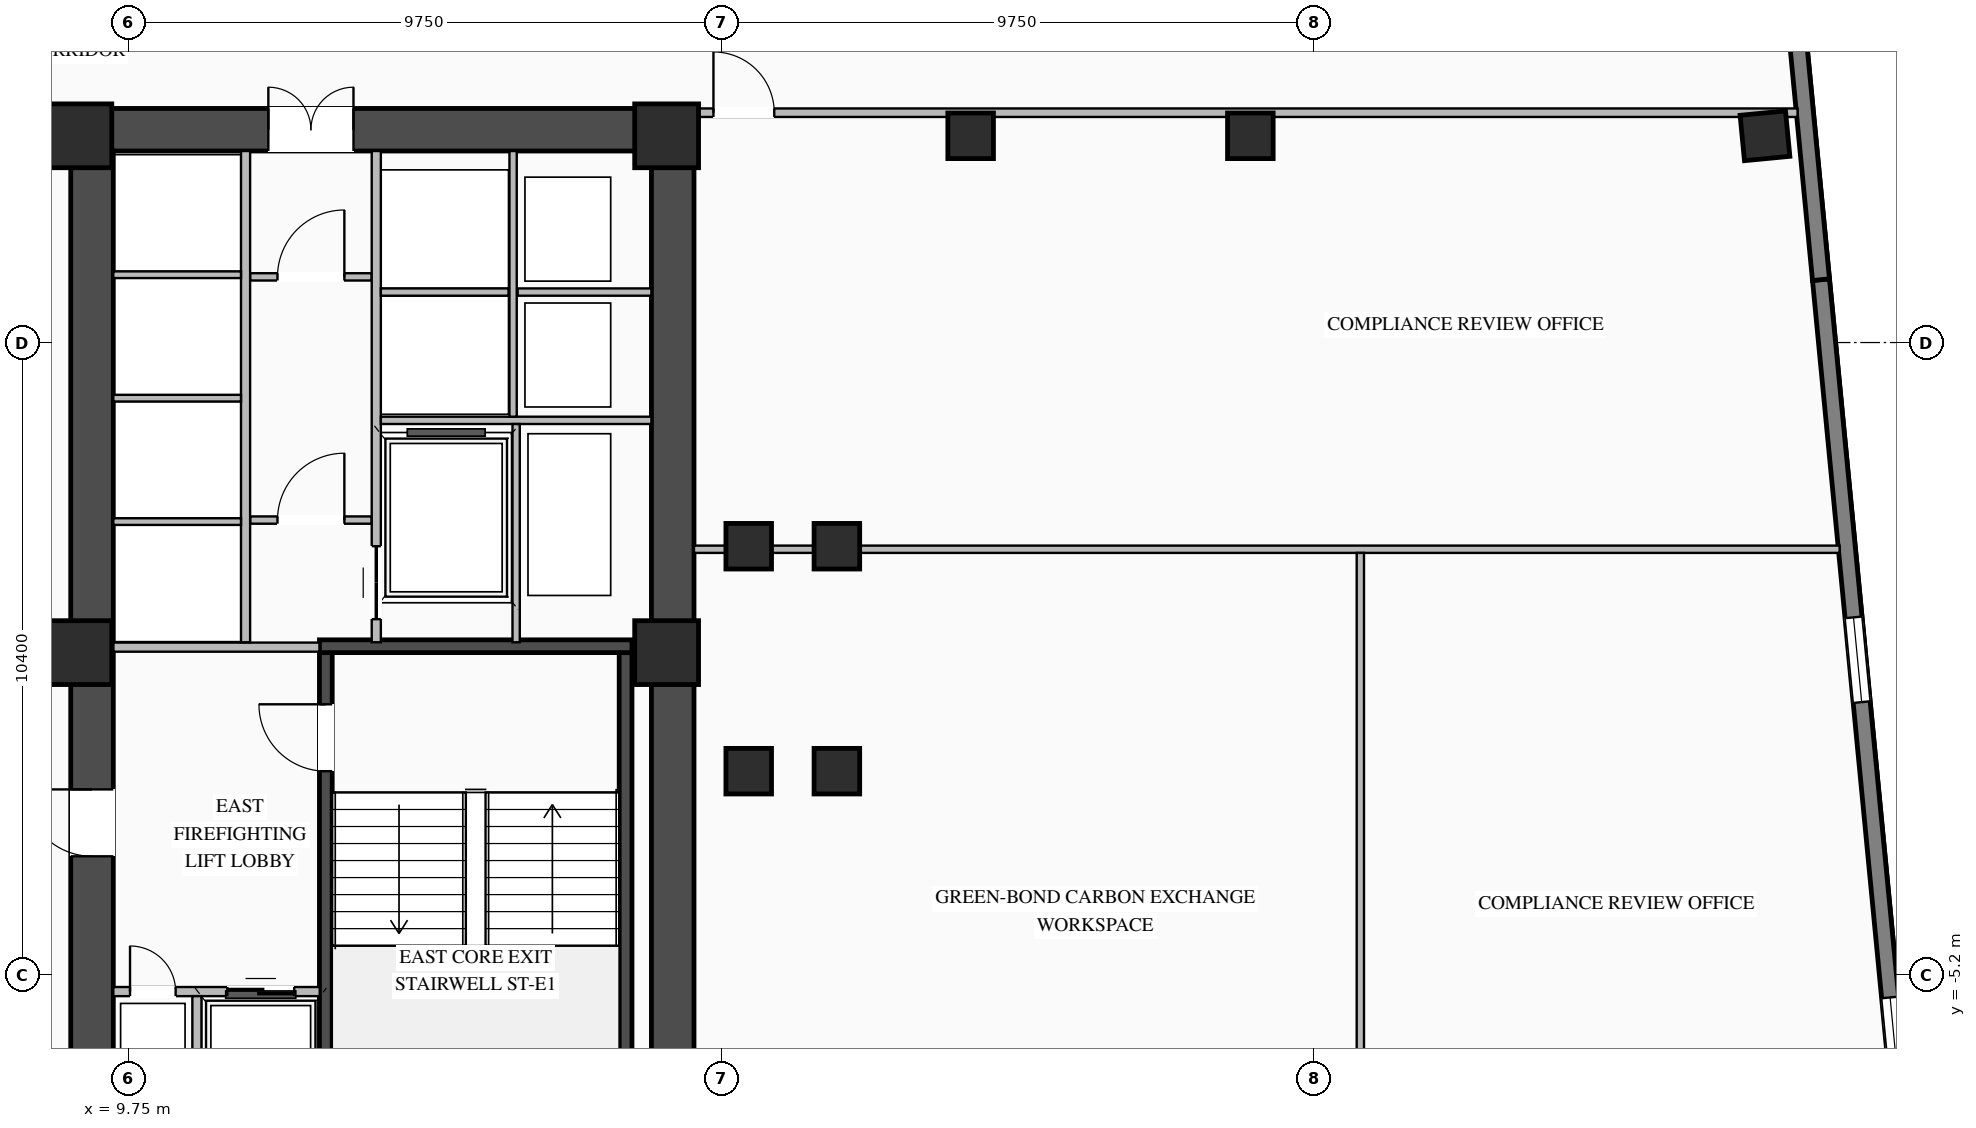
"""IFC4 building model, lengths in metres.
Left out: names, types, materials, properties, quantities, classifications, styles, units other than length and angle.
Written with IfcOpenShell. Run it as: python <this file> out.ifc"""

import sys

from ifc_helpers import new_model, si_unit, direction, frame, frame_2d, origin, origin_2d, place, context, subcontext, project, spatial, rectangle, i_section, extrude, element, fill, save


model = new_model("IFC4")
c1 = context("Model", 3, precision=1e-05, world=origin(), true_north=direction((0.0, 1.0)))
c2 = subcontext(c1, "Body", "Model", "MODEL_VIEW")
j1 = project(units=[si_unit("LENGTHUNIT", "METRE"), si_unit("PLANEANGLEUNIT", "RADIAN")], contexts=[c1])
p1 = place(None, origin())
s1 = spatial("IfcSite", under=j1, at=p1, CompositionType="ELEMENT")
p2 = place(p1, origin())
s2 = spatial("IfcBuilding", under=s1, at=p2, CompositionType="ELEMENT")
p3 = place(p2, frame((0.0, 0.0, 94.9)))
s3 = spatial("IfcBuildingStorey", under=s2, at=p3, CompositionType="ELEMENT", Elevation=94.9)
p4 = place(p3, frame((8.8, 8.7, 0.0), z_axis=(0.0, 0.0, 1.0), x_axis=(1.0, 0.0, 0.0)))
e1 = element("IfcWall", 1, at=p4, inside=s3, PredefinedType="SHEAR", context=c2, shape_type="SweptSolid", body=[
    extrude(rectangle(XDim=10.25, YDim=0.7, at=frame_2d((5.125, 0.0))), origin(), (0.0, 0.0, 1.0), 3.27),
])
p5 = place(p4, frame((3.25, 0.0, 0.0)))
e2 = element("IfcOpeningElement", 2, at=p5, cuts=e1, PredefinedType="OPENING", context=c2, shape_type="SweptSolid", body=[
    extrude(rectangle(XDim=1.4, YDim=2.05, at=frame_2d((0.7, 1.025))), frame((0.0, 0.36, 0.0), z_axis=(0.0, -1.0, 0.0), x_axis=(1.0, 0.0, 0.0)), (0.0, 0.0, 1.0), 0.72),
])
p6 = place(p3, frame((9.15, -8.35, 0.0), z_axis=(0.0, 0.0, 1.0), x_axis=(0.0, 1.0, 0.0)))
e3 = element("IfcWall", 3, at=p6, inside=s3, PredefinedType="SHEAR", context=c2, shape_type="SweptSolid", body=[
    extrude(rectangle(XDim=16.7, YDim=0.7, at=frame_2d((8.35, 0.0))), origin(), (0.0, 0.0, 1.0), 3.27),
])
p7 = place(p6, frame((5.1, 0.0, 0.0)))
e4 = element("IfcOpeningElement", 4, at=p7, cuts=e3, PredefinedType="OPENING", context=c2, shape_type="SweptSolid", body=[
    extrude(rectangle(XDim=1.1, YDim=2.08, at=frame_2d((0.55, 1.04))), frame((0.0, 0.36, 0.0), z_axis=(0.0, -1.0, 0.0), x_axis=(1.0, 0.0, 0.0)), (0.0, 0.0, 1.0), 0.72),
])
p8 = place(p3, frame((18.7, -8.35, 0.0), z_axis=(0.0, 0.0, 1.0), x_axis=(0.0, 1.0, 0.0)))
e5 = element("IfcWall", 5, at=p8, inside=s3, PredefinedType="SHEAR", context=c2, shape_type="SweptSolid", body=[
    extrude(rectangle(XDim=16.7, YDim=0.7, at=frame_2d((8.35, 0.0))), origin(), (0.0, 0.0, 1.0), 3.27),
])
p9 = place(p3, frame((12.995, -8.1, 0.0), z_axis=(0.0, 0.0, 1.0), x_axis=(0.0, 1.0, 0.0)))
e6 = element("IfcWall", 6, at=p9, inside=s3, PredefinedType="SHEAR", context=c2, shape_type="SweptSolid", body=[
    extrude(rectangle(XDim=8.2, YDim=0.21, at=frame_2d((4.1, 0.0))), origin(), (0.0, 0.0, 1.0), 3.27),
])
p10 = place(p9, frame((6.25, 0.0, 0.0)))
e7 = element("IfcOpeningElement", 7, at=p10, cuts=e6, PredefinedType="OPENING", context=c2, shape_type="SweptSolid", body=[
    extrude(rectangle(XDim=1.1, YDim=2.15, at=frame_2d((0.55, 1.075))), frame((0.0, 0.115, 0.0), z_axis=(0.0, -1.0, 0.0), x_axis=(1.0, 0.0, 0.0)), (0.0, 0.0, 1.0), 0.23),
])
p11 = place(p3, frame((17.925, -8.1, 0.0), z_axis=(0.0, 0.0, 1.0), x_axis=(0.0, 1.0, 0.0)))
e8 = element("IfcWall", 8, at=p11, inside=s3, PredefinedType="SHEAR", context=c2, shape_type="SweptSolid", body=[
    extrude(rectangle(XDim=8.2, YDim=0.21, at=frame_2d((4.1, 0.0))), origin(), (0.0, 0.0, 1.0), 3.27),
])
p12 = place(p3, frame((18.03, 0.205, 0.0), z_axis=(0.0, 0.0, 1.0), x_axis=(-1.0, 0.0, 0.0)))
e9 = element("IfcWall", 9, at=p12, inside=s3, PredefinedType="SHEAR", context=c2, shape_type="SweptSolid", body=[
    extrude(rectangle(XDim=5.14, YDim=0.21, at=frame_2d((2.57, 0.0))), origin(), (0.0, 0.0, 1.0), 3.27),
])
for number, where, z_axis, x_axis in (
    (10, (8.95, 0.1, 0.0), (0.0, 0.0, 1.0), (1.0, 0.0, 0.0)),
    (11, (8.95, 8.6, 0.0), (0.0, 0.0, 1.0), (1.0, 0.0, 0.0)),
    (12, (18.6, 0.1, 0.0), (0.0, 0.0, 1.0), (1.0, 0.0, 0.0)),
    (13, (18.6, 8.6, 0.0), (0.0, 0.0, 1.0), (1.0, 0.0, 0.0)),
):
    element("IfcColumn", number, at=place(p3, frame(where, z_axis=z_axis, x_axis=x_axis)), inside=s3, PredefinedType="COLUMN", context=c2, shape_type="SweptSolid", body=[
        extrude(rectangle(XDim=1.05, YDim=1.05, at=origin_2d()), origin(), (0.0, 0.0, 1.0), 3.45),
    ])
for number, where, z_axis, x_axis in (
    (14, (19.95, -1.85, 0.0), (0.0, 0.0, 1.0), (1.0, 0.0, 0.0)),
    (15, (19.95, 1.85, 0.0), (0.0, 0.0, 1.0), (1.0, 0.0, 0.0)),
    (16, (21.4, -1.85, 0.0), (0.0, 0.0, 1.0), (1.0, 0.0, 0.0)),
    (17, (21.4, 1.85, 0.0), (0.0, 0.0, 1.0), (1.0, 0.0, 0.0)),
    (18, (23.6, 8.6, 0.0), (0.0, 0.0, 1.0), (1.0, 0.0, 0.0)),
    (19, (28.2, 8.6, 0.0), (0.0, 0.0, 1.0), (1.0, 0.0, 0.0)),
    (20, (36.664, 8.6, 0.0), (0.0, 0.0, 1.0), (0.995, 0.096, 0.0)),
):
    element("IfcColumn", number, at=place(p3, frame(where, z_axis=z_axis, x_axis=x_axis)), inside=s3, PredefinedType="COLUMN", context=c2, shape_type="SweptSolid", body=[
        extrude(i_section(OverallWidth=0.75, OverallDepth=0.75, WebThickness=0.03, FlangeThickness=0.044, at=origin_2d()), origin(), (0.0, 0.0, 1.0), 3.45),
    ])
p13 = place(p3, frame((37.585, 6.234, 0.0), z_axis=(0.0, 0.0, 1.0), x_axis=(0.095841297881, -0.99539662729, 0.0)))
e21 = element("IfcWall", 21, at=p13, inside=s3, PredefinedType="STANDARD", context=c2, shape_type="SweptSolid", body=[
    extrude(rectangle(XDim=18.84, YDim=0.28, at=frame_2d((9.42, 0.0))), origin(), (0.0, 0.0, 1.0), 3.25),
])
p14 = place(p13, frame((5.58, 0.0, 0.76)))
e22 = element("IfcOpeningElement", 22, at=p14, cuts=e21, PredefinedType="OPENING", context=c2, shape_type="SweptSolid", body=[
    extrude(rectangle(XDim=1.4, YDim=1.95, at=frame_2d((0.7, 0.975))), frame((0.0, 0.15, 0.0), z_axis=(0.0, -1.0, 0.0), x_axis=(1.0, 0.0, 0.0)), (0.0, 0.0, 1.0), 0.3),
])
p15 = place(p13, frame((11.86, 0.0, 0.76)))
e23 = element("IfcOpeningElement", 23, at=p15, cuts=e21, PredefinedType="OPENING", context=c2, shape_type="SweptSolid", body=[
    extrude(rectangle(XDim=1.4, YDim=1.95, at=frame_2d((0.7, 0.975))), frame((0.0, 0.15, 0.0), z_axis=(0.0, -1.0, 0.0), x_axis=(1.0, 0.0, 0.0)), (0.0, 0.0, 1.0), 0.3),
])
p16 = place(p3, frame((35.779, 24.987, 0.0), z_axis=(0.0, 0.0, 1.0), x_axis=(0.095842534142, -0.995396508256, 0.0)))
e24 = element("IfcWall", 24, at=p16, inside=s3, PredefinedType="STANDARD", context=c2, shape_type="SweptSolid", body=[
    extrude(rectangle(XDim=18.84, YDim=0.28, at=frame_2d((9.42, 0.0))), origin(), (0.0, 0.0, 1.0), 3.25),
])
p17 = place(p16, frame((5.58, 0.0, 0.76)))
e25 = element("IfcOpeningElement", 25, at=p17, cuts=e24, PredefinedType="OPENING", context=c2, shape_type="SweptSolid", body=[
    extrude(rectangle(XDim=1.4, YDim=1.95, at=frame_2d((0.7, 0.975))), frame((0.0, 0.15, 0.0), z_axis=(0.0, -1.0, 0.0), x_axis=(1.0, 0.0, 0.0)), (0.0, 0.0, 1.0), 0.3),
])
p18 = place(p16, frame((11.86, 0.0, 0.76)))
e26 = element("IfcOpeningElement", 26, at=p18, cuts=e24, PredefinedType="OPENING", context=c2, shape_type="SweptSolid", body=[
    extrude(rectangle(XDim=1.4, YDim=1.95, at=frame_2d((0.7, 0.975))), frame((0.0, 0.15, 0.0), z_axis=(0.0, -1.0, 0.0), x_axis=(1.0, 0.0, 0.0)), (0.0, 0.0, 1.0), 0.3),
])
p19 = place(p3, frame((9.5, -5.475, 0.0), z_axis=(0.0, 0.0, 1.0), x_axis=(1.0, 0.0, 0.0)))
e27 = element("IfcWall", 27, at=p19, inside=s3, PredefinedType="STANDARD", context=c2, shape_type="SweptSolid", body=[
    extrude(rectangle(XDim=3.395, YDim=0.15, at=frame_2d((1.698, 0.0))), origin(), (0.0, 0.0, 1.0), 3.25),
])
p20 = place(p19, frame((1.875, 0.0, 0.0)))
e28 = element("IfcOpeningElement", 28, at=p20, cuts=e27, PredefinedType="OPENING", context=c2, shape_type="SweptSolid", body=[
    extrude(rectangle(XDim=1.1, YDim=2.15, at=frame_2d((0.55, 1.075))), frame((0.0, 0.085, 0.0), z_axis=(0.0, -1.0, 0.0), x_axis=(1.0, 0.0, 0.0)), (0.0, 0.0, 1.0), 0.17),
])
p21 = place(p19, frame((0.275, 0.0, 0.0)))
e29 = element("IfcOpeningElement", 29, at=p21, cuts=e27, PredefinedType="OPENING", context=c2, shape_type="SweptSolid", body=[
    extrude(rectangle(XDim=0.75, YDim=2.05, at=frame_2d((0.375, 1.025))), frame((0.0, 0.085, 0.0), z_axis=(0.0, -1.0, 0.0), x_axis=(1.0, 0.0, 0.0)), (0.0, 0.0, 1.0), 0.17),
])
p22 = place(p3, frame((10.875, -8.35, 0.0), z_axis=(0.0, 0.0, 1.0), x_axis=(0.0, 1.0, 0.0)))
e30 = element("IfcWall", 30, at=p22, inside=s3, PredefinedType="STANDARD", context=c2, shape_type="SweptSolid", body=[
    extrude(rectangle(XDim=2.8, YDim=0.15, at=frame_2d((1.4, 0.0))), origin(), (0.0, 0.0, 1.0), 3.25),
])
p23 = place(p3, frame((9.5, 0.19, 0.0), z_axis=(0.0, 0.0, 1.0), x_axis=(1.0, 0.0, 0.0)))
e31 = element("IfcWall", 31, at=p23, inside=s3, PredefinedType="STANDARD", context=c2, shape_type="SweptSolid", body=[
    extrude(rectangle(XDim=3.39, YDim=0.15, at=frame_2d((1.695, 0.0))), origin(), (0.0, 0.0, 1.0), 2.645),
])
p24 = place(p3, frame((11.75, 2.28, 0.0), z_axis=(0.0, 0.0, 1.0), x_axis=(1.0, 0.0, 0.0)))
e32 = element("IfcWall", 32, at=p24, inside=s3, PredefinedType="STANDARD", context=c2, shape_type="SweptSolid", body=[
    extrude(rectangle(XDim=2.0, YDim=0.12, at=frame_2d((1.0, 0.0))), origin(), (0.0, 0.0, 1.0), 3.25),
])
p25 = place(p24, frame((0.45, 0.0, 0.0)))
e33 = element("IfcOpeningElement", 33, at=p25, cuts=e32, PredefinedType="OPENING", context=c2, shape_type="SweptSolid", body=[
    extrude(rectangle(XDim=1.1, YDim=2.1, at=frame_2d((0.55, 1.05))), frame((0.0, 0.07, 0.0), z_axis=(0.0, -1.0, 0.0), x_axis=(1.0, 0.0, 0.0)), (0.0, 0.0, 1.0), 0.14),
])
p26 = place(p3, frame((11.75, 6.28, 0.0), z_axis=(0.0, 0.0, 1.0), x_axis=(1.0, 0.0, 0.0)))
e34 = element("IfcWall", 34, at=p26, inside=s3, PredefinedType="STANDARD", context=c2, shape_type="SweptSolid", body=[
    extrude(rectangle(XDim=2.0, YDim=0.12, at=frame_2d((1.0, 0.0))), origin(), (0.0, 0.0, 1.0), 3.25),
])
p27 = place(p26, frame((0.45, 0.0, 0.0)))
e35 = element("IfcOpeningElement", 35, at=p27, cuts=e34, PredefinedType="OPENING", context=c2, shape_type="SweptSolid", body=[
    extrude(rectangle(XDim=1.1, YDim=2.1, at=frame_2d((0.55, 1.05))), frame((0.0, 0.07, 0.0), z_axis=(0.0, -1.0, 0.0), x_axis=(1.0, 0.0, 0.0)), (0.0, 0.0, 1.0), 0.14),
])
p28 = place(p3, frame((11.675, 0.27, 0.0), z_axis=(0.0, 0.0, 1.0), x_axis=(0.0, 1.0, 0.0)))
e36 = element("IfcWall", 36, at=p28, inside=s3, PredefinedType="STANDARD", context=c2, shape_type="SweptSolid", body=[
    extrude(rectangle(XDim=8.08, YDim=0.15, at=frame_2d((4.04, 0.0))), origin(), (0.0, 0.0, 1.0), 3.25),
])
for number, where, z_axis, x_axis in (
    (37, (9.5, 2.255, 0.0), (0.0, 0.0, 1.0), (1.0, 0.0, 0.0)),
    (38, (9.5, 4.285, 0.0), (0.0, 0.0, 1.0), (1.0, 0.0, 0.0)),
    (39, (9.5, 6.315, 0.0), (0.0, 0.0, 1.0), (1.0, 0.0, 0.0)),
):
    element("IfcWall", number, at=place(p3, frame(where, z_axis=z_axis, x_axis=x_axis)), inside=s3, PredefinedType="STANDARD", context=c2, shape_type="SweptSolid", body=[
        extrude(rectangle(XDim=2.1, YDim=0.11, at=frame_2d((1.05, 0.0))), origin(), (0.0, 0.0, 1.0), 3.25),
    ])
p29 = place(p3, frame((13.825, 0.27, 0.0), z_axis=(0.0, 0.0, 1.0), x_axis=(0.0, 1.0, 0.0)))
e40 = element("IfcWall", 40, at=p29, inside=s3, PredefinedType="STANDARD", context=c2, shape_type="SweptSolid", body=[
    extrude(rectangle(XDim=8.08, YDim=0.15, at=frame_2d((4.04, 0.0))), origin(), (0.0, 0.0, 1.0), 3.25),
])
p30 = place(p29, frame((0.38, 0.0, 0.0)))
e41 = element("IfcOpeningElement", 41, at=p30, cuts=e40, PredefinedType="OPENING", context=c2, shape_type="SweptSolid", body=[
    extrude(rectangle(XDim=1.2, YDim=2.1, at=frame_2d((0.6, 1.05))), frame((0.0, 0.085, 0.0), z_axis=(0.0, -1.0, 0.0), x_axis=(1.0, 0.0, 0.0)), (0.0, 0.0, 1.0), 0.17),
])
p31 = place(p3, frame((13.9, 3.92, 0.0), z_axis=(0.0, 0.0, 1.0), x_axis=(1.0, 0.0, 0.0)))
e42 = element("IfcWall", 42, at=p31, inside=s3, PredefinedType="STANDARD", context=c2, shape_type="SweptSolid", body=[
    extrude(rectangle(XDim=4.45, YDim=0.12, at=frame_2d((2.225, 0.0))), origin(), (0.0, 0.0, 1.0), 3.25),
])
p32 = place(p3, frame((16.15, 6.03, 0.0), z_axis=(0.0, 0.0, 1.0), x_axis=(1.0, 0.0, 0.0)))
e43 = element("IfcWall", 43, at=p32, inside=s3, PredefinedType="STANDARD", context=c2, shape_type="SweptSolid", body=[
    extrude(rectangle(XDim=2.2, YDim=0.12, at=frame_2d((1.1, 0.0))), origin(), (0.0, 0.0, 1.0), 3.25),
])
p33 = place(p3, frame((16.075, 3.98, 0.0), z_axis=(0.0, 0.0, 1.0), x_axis=(0.0, 1.0, 0.0)))
e44 = element("IfcWall", 44, at=p33, inside=s3, PredefinedType="STANDARD", context=c2, shape_type="SweptSolid", body=[
    extrude(rectangle(XDim=4.37, YDim=0.12, at=frame_2d((2.185, 0.0))), origin(), (0.0, 0.0, 1.0), 3.25),
])
p34 = place(p3, frame((13.9, 6.03, 0.0), z_axis=(0.0, 0.0, 1.0), x_axis=(1.0, 0.0, 0.0)))
e45 = element("IfcWall", 45, at=p34, inside=s3, PredefinedType="STANDARD", context=c2, shape_type="SweptSolid", body=[
    extrude(rectangle(XDim=2.1, YDim=0.12, at=frame_2d((1.05, 0.0))), origin(), (0.0, 0.0, 1.0), 3.25),
])
p35 = place(p3, frame((16.125, 0.27, 0.0), z_axis=(0.0, 0.0, 1.0), x_axis=(0.0, 1.0, 0.0)))
e46 = element("IfcWall", 46, at=p35, inside=s3, PredefinedType="STANDARD", context=c2, shape_type="SweptSolid", body=[
    extrude(rectangle(XDim=3.59, YDim=0.12, at=frame_2d((1.795, 0.0))), origin(), (0.0, 0.0, 1.0), 3.25),
])
p36 = place(p3, frame((19.05, 8.98, 0.0), z_axis=(0.0, 0.0, 1.0), x_axis=(1.0, 0.0, 0.0)))
e47 = element("IfcWall", 47, at=p36, inside=s3, PredefinedType="STANDARD", context=c2, shape_type="SweptSolid", body=[
    extrude(rectangle(XDim=18.15, YDim=0.14, at=frame_2d((9.075, 0.0))), origin(), (0.0, 0.0, 1.0), 3.25),
])
p37 = place(p36, frame((0.32, 0.0, 0.0)))
e48 = element("IfcOpeningElement", 48, at=p37, cuts=e47, PredefinedType="OPENING", context=c2, shape_type="SweptSolid", body=[
    extrude(rectangle(XDim=1.0, YDim=2.08, at=frame_2d((0.5, 1.04))), frame((0.0, 0.08, 0.0), z_axis=(0.0, -1.0, 0.0), x_axis=(1.0, 0.0, 0.0)), (0.0, 0.0, 1.0), 0.16),
])
p38 = place(p3, frame((19.05, 1.8, 0.0), z_axis=(0.0, 0.0, 1.0), x_axis=(1.0, 0.0, 0.0)))
e49 = element("IfcWall", 49, at=p38, inside=s3, PredefinedType="STANDARD", context=c2, shape_type="SweptSolid", body=[
    extrude(rectangle(XDim=18.841, YDim=0.12, at=frame_2d((9.42, 0.0))), origin(), (0.0, 0.0, 1.0), 3.25),
])
p39 = place(p3, frame((30.009, -8.98, 0.0), z_axis=(0.0, 0.0, 1.0), x_axis=(0.0, 1.0, 0.0)))
e50 = element("IfcWall", 50, at=p39, inside=s3, PredefinedType="STANDARD", context=c2, shape_type="SweptSolid", body=[
    extrude(rectangle(XDim=10.72, YDim=0.12, at=frame_2d((5.36, 0.0))), origin(), (0.0, 0.0, 1.0), 3.25),
])
p40 = place(p14, origin())
e51 = element("IfcWindow", 51, at=p40, inside=s3, PartitioningType="SINGLE_PANEL", PredefinedType="WINDOW", context=c2, shape_type="SweptSolid", body=[
    extrude(rectangle(XDim=1.4, YDim=1.95, at=frame_2d((0.7, 0.975))), frame((0.0, 0.03, 0.0), z_axis=(0.0, -1.0, 0.0), x_axis=(1.0, 0.0, 0.0)), (0.0, 0.0, 1.0), 0.06),
])
fill(e22, e51)
p41 = place(p15, origin())
e52 = element("IfcWindow", 52, at=p41, inside=s3, PartitioningType="SINGLE_PANEL", PredefinedType="WINDOW", context=c2, shape_type="SweptSolid", body=[
    extrude(rectangle(XDim=1.4, YDim=1.95, at=frame_2d((0.7, 0.975))), frame((0.0, 0.03, 0.0), z_axis=(0.0, -1.0, 0.0), x_axis=(1.0, 0.0, 0.0)), (0.0, 0.0, 1.0), 0.06),
])
fill(e23, e52)
p42 = place(p10, origin())
e53 = element("IfcDoor", 53, at=p42, inside=s3, OperationType="SINGLE_SWING_RIGHT", PredefinedType="DOOR", context=c2, shape_type="SweptSolid", body=[
    extrude(rectangle(XDim=1.1, YDim=2.15, at=frame_2d((0.55, 1.075))), frame((0.0, 0.025, 0.0), z_axis=(0.0, -1.0, 0.0), x_axis=(1.0, 0.0, 0.0)), (0.0, 0.0, 1.0), 0.05),
])
fill(e7, e53)
p43 = place(p20, origin())
e54 = element("IfcDoor", 54, at=p43, inside=s3, OperationType="DOUBLE_DOOR_SLIDING", PredefinedType="DOOR", context=c2, shape_type="SweptSolid", body=[
    extrude(rectangle(XDim=1.1, YDim=2.15, at=frame_2d((0.55, 1.075))), frame((0.0, 0.025, 0.0), z_axis=(0.0, -1.0, 0.0), x_axis=(1.0, 0.0, 0.0)), (0.0, 0.0, 1.0), 0.05),
])
fill(e28, e54)
p44 = place(p21, origin())
e55 = element("IfcDoor", 55, at=p44, inside=s3, OperationType="SINGLE_SWING_LEFT", PredefinedType="DOOR", context=c2, shape_type="SweptSolid", body=[
    extrude(rectangle(XDim=0.75, YDim=2.05, at=frame_2d((0.375, 1.025))), frame((0.0, 0.025, 0.0), z_axis=(0.0, -1.0, 0.0), x_axis=(1.0, 0.0, 0.0)), (0.0, 0.0, 1.0), 0.05),
])
fill(e29, e55)
p45 = place(p7, origin())
e56 = element("IfcDoor", 56, at=p45, inside=s3, OperationType="SINGLE_SWING_RIGHT", PredefinedType="DOOR", context=c2, shape_type="SweptSolid", body=[
    extrude(rectangle(XDim=1.1, YDim=2.08, at=frame_2d((0.55, 1.04))), frame((0.0, -0.255, 0.0), z_axis=(0.0, -1.0, 0.0), x_axis=(1.0, 0.0, 0.0)), (0.0, 0.0, 1.0), 0.05),
])
fill(e4, e56)
p46 = place(p25, origin())
e57 = element("IfcDoor", 57, at=p46, inside=s3, OperationType="SINGLE_SWING_RIGHT", PredefinedType="DOOR", context=c2, shape_type="SweptSolid", body=[
    extrude(rectangle(XDim=1.1, YDim=2.1, at=frame_2d((0.55, 1.05))), frame((0.0, 0.025, 0.0), z_axis=(0.0, -1.0, 0.0), x_axis=(1.0, 0.0, 0.0)), (0.0, 0.0, 1.0), 0.05),
])
fill(e33, e57)
p47 = place(p27, origin())
e58 = element("IfcDoor", 58, at=p47, inside=s3, OperationType="SINGLE_SWING_RIGHT", PredefinedType="DOOR", context=c2, shape_type="SweptSolid", body=[
    extrude(rectangle(XDim=1.1, YDim=2.1, at=frame_2d((0.55, 1.05))), frame((0.0, 0.025, 0.0), z_axis=(0.0, -1.0, 0.0), x_axis=(1.0, 0.0, 0.0)), (0.0, 0.0, 1.0), 0.05),
])
fill(e35, e58)
p48 = place(p5, origin())
e59 = element("IfcDoor", 59, at=p48, inside=s3, OperationType="DOUBLE_DOOR_SINGLE_SWING", PredefinedType="DOOR", context=c2, shape_type="SweptSolid", body=[
    extrude(rectangle(XDim=1.4, YDim=2.05, at=frame_2d((0.7, 1.025))), frame((0.0, 0.295, 0.0), z_axis=(0.0, -1.0, 0.0), x_axis=(1.0, 0.0, 0.0)), (0.0, 0.0, 1.0), 0.05),
])
fill(e2, e59)
p49 = place(p30, origin())
e60 = element("IfcDoor", 60, at=p49, inside=s3, OperationType="DOUBLE_DOOR_SLIDING", PredefinedType="DOOR", context=c2, shape_type="SweptSolid", body=[
    extrude(rectangle(XDim=1.2, YDim=2.1, at=frame_2d((0.6, 1.05))), frame((0.0, 0.025, 0.0), z_axis=(0.0, -1.0, 0.0), x_axis=(1.0, 0.0, 0.0)), (0.0, 0.0, 1.0), 0.05),
])
fill(e41, e60)
p50 = place(p37, origin())
e61 = element("IfcDoor", 61, at=p50, inside=s3, OperationType="SINGLE_SWING_LEFT", PredefinedType="DOOR", context=c2, shape_type="SweptSolid", body=[
    extrude(rectangle(XDim=1.0, YDim=2.08, at=frame_2d((0.5, 1.04))), frame((0.0, 0.025, 0.0), z_axis=(0.0, -1.0, 0.0), x_axis=(1.0, 0.0, 0.0)), (0.0, 0.0, 1.0), 0.05),
])
fill(e48, e61)
save(model, sys.argv[1])
